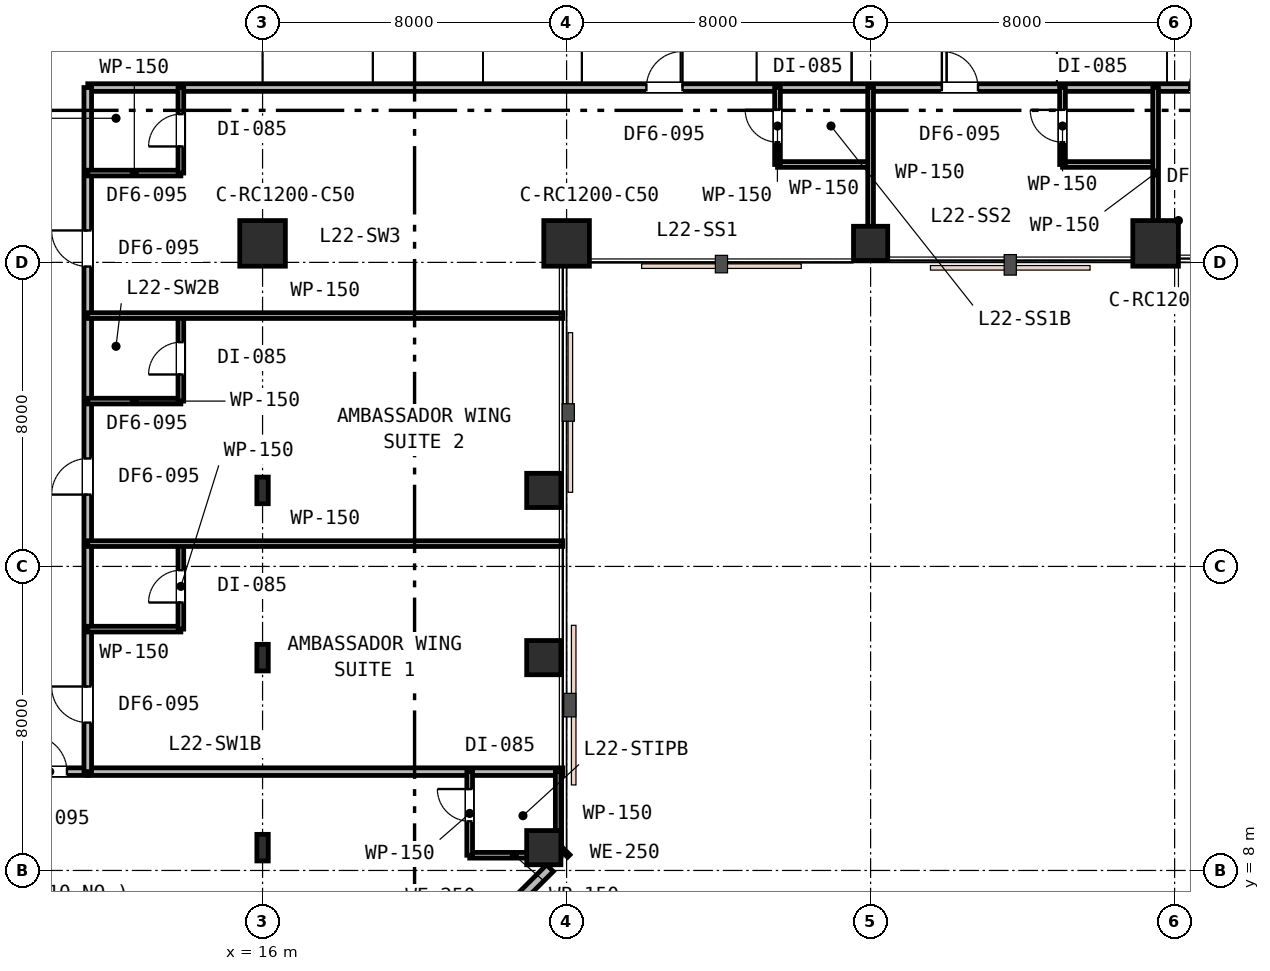
"""IFC4 building model, lengths in metres.
Left out: names, types, materials, properties, quantities, classifications, styles, units other than length and angle.
Written with IfcOpenShell. Run it as: python <this file> out.ifc"""

import sys

from ifc_helpers import new_model, si_unit, direction, frame, frame_2d, origin, origin_2d, place, context, subcontext, project, spatial, rectangle, i_section, extrude, element, fill, save


model = new_model("IFC4")
c1 = context("Model", 3, precision=1e-05, world=origin(), true_north=direction((0.0, 1.0)))
c2 = subcontext(c1, "Body", "Model", "MODEL_VIEW")
j1 = project(units=[si_unit("LENGTHUNIT", "METRE"), si_unit("PLANEANGLEUNIT", "RADIAN")], contexts=[c1])
p1 = place(None, origin())
s1 = spatial("IfcSite", under=j1, at=p1, CompositionType="ELEMENT")
p2 = place(p1, origin())
s2 = spatial("IfcBuilding", under=s1, at=p2, CompositionType="ELEMENT")
p3 = place(p2, frame((0.0, 0.0, 90.0)))
s3 = spatial("IfcBuildingStorey", under=s2, at=p3, CompositionType="ELEMENT", Elevation=90.0)
for number, where, z_axis, x_axis in (
    (1, (16.0, 24.5, 0.0), (0.0, 0.0, 1.0), (1.0, 0.0, 0.0)),
    (2, (24.0, 24.5, 0.0), (0.0, 0.0, 1.0), (1.0, 0.0, 0.0)),
):
    element("IfcColumn", number, at=place(p3, frame(where, z_axis=z_axis, x_axis=x_axis)), inside=s3, PredefinedType="COLUMN", context=c2, shape_type="SweptSolid", body=[
        extrude(rectangle(XDim=1.2, YDim=1.2, at=origin_2d()), origin(), (0.0, 0.0, 1.0), 3.6),
    ])
p4 = place(p3, frame((32.0, 24.5, 0.0), z_axis=(0.0, 0.0, 1.0), x_axis=(1.0, 0.0, 0.0)))
e3 = element("IfcColumn", 3, at=p4, inside=s3, PredefinedType="COLUMN", context=c2, shape_type="SweptSolid", body=[
    extrude(rectangle(XDim=0.9, YDim=0.9, at=origin_2d()), origin(), (0.0, 0.0, 1.0), 3.6),
])
p5 = place(p3, frame((39.5, 24.5, 0.0), z_axis=(0.0, 0.0, 1.0), x_axis=(1.0, 0.0, 0.0)))
e4 = element("IfcColumn", 4, at=p5, inside=s3, PredefinedType="COLUMN", context=c2, shape_type="SweptSolid", body=[
    extrude(rectangle(XDim=1.2, YDim=1.2, at=origin_2d()), origin(), (0.0, 0.0, 1.0), 3.6),
])
for number, where, z_axis, x_axis in (
    (5, (23.4, 8.6, 0.0), (0.0, 0.0, 1.0), (1.0, 0.0, 0.0)),
    (6, (23.4, 13.6, 0.0), (0.0, 0.0, 1.0), (1.0, 0.0, 0.0)),
    (7, (23.4, 18.0, 0.0), (0.0, 0.0, 1.0), (1.0, 0.0, 0.0)),
):
    element("IfcColumn", number, at=place(p3, frame(where, z_axis=z_axis, x_axis=x_axis)), inside=s3, PredefinedType="COLUMN", context=c2, shape_type="SweptSolid", body=[
        extrude(rectangle(XDim=0.9, YDim=0.9, at=origin_2d()), origin(), (0.0, 0.0, 1.0), 3.6),
    ])
for number, where, z_axis, x_axis in (
    (8, (16.0, 8.6, 0.0), (0.0, 0.0, 1.0), (1.0, 0.0, 0.0)),
    (9, (16.0, 13.6, 0.0), (0.0, 0.0, 1.0), (1.0, 0.0, 0.0)),
    (10, (16.0, 18.0, 0.0), (0.0, 0.0, 1.0), (1.0, 0.0, 0.0)),
):
    element("IfcColumn", number, at=place(p3, frame(where, z_axis=z_axis, x_axis=x_axis)), inside=s3, PredefinedType="COLUMN", context=c2, shape_type="SweptSolid", body=[
        extrude(i_section(OverallWidth=0.3, OverallDepth=0.7, WebThickness=0.017, FlangeThickness=0.032, FilletRadius=0.027, at=origin_2d()), origin(), (0.0, 0.0, 1.0), 3.6),
    ])
p6 = place(p3, frame((20.5, 5.0, 0.0), z_axis=(0.0, 0.0, 1.0), x_axis=(0.707106781187, 0.707106781187, 0.0)))
e11 = element("IfcWall", 11, at=p6, inside=s3, PredefinedType="STANDARD", context=c2, shape_type="SweptSolid", body=[
    extrude(rectangle(XDim=4.33, YDim=0.25, at=frame_2d((2.165, 0.0))), origin(), (0.0, 0.0, 1.0), 3.33),
])
p7 = place(p6, frame((1.565, 0.0, 0.85)))
e12 = element("IfcOpeningElement", 12, at=p7, cuts=e11, PredefinedType="OPENING", context=c2, shape_type="SweptSolid", body=[
    extrude(rectangle(XDim=1.2, YDim=1.6, at=frame_2d((0.6, 0.8))), frame((0.0, 0.135, 0.0), z_axis=(0.0, -1.0, 0.0), x_axis=(1.0, 0.0, 0.0)), (0.0, 0.0, 1.0), 0.27),
])
p8 = place(p3, frame((23.938, 8.438, 0.0), z_axis=(0.0, 0.0, 1.0), x_axis=(0.707106781187, 0.707106781187, 0.0)))
e13 = element("IfcWall", 13, at=p8, inside=s3, PredefinedType="STANDARD", context=c2, shape_type="SweptSolid", body=[
    extrude(rectangle(XDim=0.087, YDim=0.25, at=frame_2d((0.044, 0.0))), origin(), (0.0, 0.0, 1.0), 3.33),
])
p9 = place(p3, frame((11.4, 28.6, 0.0), z_axis=(0.0, 0.0, 1.0), x_axis=(1.0, 0.0, 0.0)))
e14 = element("IfcWall", 14, at=p9, inside=s3, PredefinedType="PARTITIONING", context=c2, shape_type="SweptSolid", body=[
    extrude(rectangle(XDim=32.8, YDim=0.2, at=frame_2d((16.4, 0.0))), origin(), (0.0, 0.0, 1.0), 2.83),
])
p10 = place(p9, frame((14.7, 0.0, 0.0)))
e15 = element("IfcOpeningElement", 15, at=p10, cuts=e14, PredefinedType="OPENING", context=c2, shape_type="SweptSolid", body=[
    extrude(rectangle(XDim=0.95, YDim=2.15, at=frame_2d((0.475, 1.075))), frame((0.0, 0.11, 0.0), z_axis=(0.0, -1.0, 0.0), x_axis=(1.0, 0.0, 0.0)), (0.0, 0.0, 1.0), 0.22),
])
p11 = place(p9, frame((22.475, 0.0, 0.0)))
e16 = element("IfcOpeningElement", 16, at=p11, cuts=e14, PredefinedType="OPENING", context=c2, shape_type="SweptSolid", body=[
    extrude(rectangle(XDim=0.95, YDim=2.15, at=frame_2d((0.475, 1.075))), frame((0.0, 0.11, 0.0), z_axis=(0.0, -1.0, 0.0), x_axis=(1.0, 0.0, 0.0)), (0.0, 0.0, 1.0), 0.22),
])
p12 = place(p9, frame((28.985, 0.0, 0.0)))
e17 = element("IfcOpeningElement", 17, at=p12, cuts=e14, PredefinedType="OPENING", context=c2, shape_type="SweptSolid", body=[
    extrude(rectangle(XDim=0.95, YDim=2.15, at=frame_2d((0.475, 1.075))), frame((0.0, 0.11, 0.0), z_axis=(0.0, -1.0, 0.0), x_axis=(1.0, 0.0, 0.0)), (0.0, 0.0, 1.0), 0.22),
])
p13 = place(p3, frame((11.4, 10.6, 0.0), z_axis=(0.0, 0.0, 1.0), x_axis=(1.0, 0.0, 0.0)))
e18 = element("IfcWall", 18, at=p13, inside=s3, PredefinedType="PARTITIONING", context=c2, shape_type="SweptSolid", body=[
    extrude(rectangle(XDim=12.5, YDim=0.2, at=frame_2d((6.25, 0.0))), origin(), (0.0, 0.0, 1.0), 2.83),
])
p14 = place(p3, frame((9.4, 10.6, 0.0), z_axis=(0.0, 0.0, 1.0), x_axis=(1.0, 0.0, 0.0)))
e19 = element("IfcWall", 19, at=p14, inside=s3, PredefinedType="PARTITIONING", context=c2, shape_type="SweptSolid", body=[
    extrude(rectangle(XDim=2.0, YDim=0.2, at=frame_2d((1.0, 0.0))), origin(), (0.0, 0.0, 1.0), 3.02),
])
p15 = place(p14, frame((0.502, 0.0, 0.0)))
e20 = element("IfcOpeningElement", 20, at=p15, cuts=e19, PredefinedType="OPENING", context=c2, shape_type="SweptSolid", body=[
    extrude(rectangle(XDim=0.95, YDim=2.15, at=frame_2d((0.475, 1.075))), frame((0.0, 0.11, 0.0), z_axis=(0.0, -1.0, 0.0), x_axis=(1.0, 0.0, 0.0)), (0.0, 0.0, 1.0), 0.22),
])
p16 = place(p3, frame((21.45, 8.4, 0.0), z_axis=(0.0, 0.0, 1.0), x_axis=(1.0, 0.0, 0.0)))
e21 = element("IfcWall", 21, at=p16, inside=s3, PredefinedType="PARTITIONING", context=c2, shape_type="SweptSolid", body=[
    extrude(rectangle(XDim=2.35, YDim=0.15, at=frame_2d((1.175, 0.0))), origin(), (0.0, 0.0, 1.0), 2.83),
])
p17 = place(p3, frame((21.45, 8.4, 0.0), z_axis=(0.0, 0.0, 1.0), x_axis=(0.0, 1.0, 0.0)))
e22 = element("IfcWall", 22, at=p17, inside=s3, PredefinedType="PARTITIONING", context=c2, shape_type="SweptSolid", body=[
    extrude(rectangle(XDim=2.2, YDim=0.15, at=frame_2d((1.1, 0.0))), origin(), (0.0, 0.0, 1.0), 2.83),
])
p18 = place(p17, frame((0.892, 0.0, 0.0)))
e23 = element("IfcOpeningElement", 23, at=p18, cuts=e22, PredefinedType="OPENING", context=c2, shape_type="SweptSolid", body=[
    extrude(rectangle(XDim=0.85, YDim=2.15, at=frame_2d((0.425, 1.075))), frame((0.0, 0.085, 0.0), z_axis=(0.0, -1.0, 0.0), x_axis=(1.0, 0.0, 0.0)), (0.0, 0.0, 1.0), 0.17),
])
p19 = place(p3, frame((23.78, 10.6, 0.0), z_axis=(0.0, 0.0, 1.0), x_axis=(0.0, -1.0, 0.0)))
e24 = element("IfcWall", 24, at=p19, inside=s3, PredefinedType="PARTITIONING", context=c2, shape_type="SweptSolid", body=[
    extrude(rectangle(XDim=2.22, YDim=0.15, at=frame_2d((1.11, 0.0))), origin(), (0.0, 0.0, 1.0), 2.83),
])
p20 = place(p3, frame((11.4, 10.6, 0.0), z_axis=(0.0, 0.0, 1.0), x_axis=(0.0, 1.0, 0.0)))
e25 = element("IfcWall", 25, at=p20, inside=s3, PredefinedType="PARTITIONING", context=c2, shape_type="SweptSolid", body=[
    extrude(rectangle(XDim=18.0, YDim=0.2, at=frame_2d((9.0, 0.0))), origin(), (0.0, 0.0, 1.0), 2.83),
])
p21 = place(p20, frame((1.29, 0.0, 0.0)))
e26 = element("IfcOpeningElement", 26, at=p21, cuts=e25, PredefinedType="OPENING", context=c2, shape_type="SweptSolid", body=[
    extrude(rectangle(XDim=0.95, YDim=2.15, at=frame_2d((0.475, 1.075))), frame((0.0, 0.11, 0.0), z_axis=(0.0, -1.0, 0.0), x_axis=(1.0, 0.0, 0.0)), (0.0, 0.0, 1.0), 0.22),
])
p22 = place(p20, frame((7.29, 0.0, 0.0)))
e27 = element("IfcOpeningElement", 27, at=p22, cuts=e25, PredefinedType="OPENING", context=c2, shape_type="SweptSolid", body=[
    extrude(rectangle(XDim=0.95, YDim=2.15, at=frame_2d((0.475, 1.075))), frame((0.0, 0.11, 0.0), z_axis=(0.0, -1.0, 0.0), x_axis=(1.0, 0.0, 0.0)), (0.0, 0.0, 1.0), 0.22),
])
p23 = place(p20, frame((13.29, 0.0, 0.0)))
e28 = element("IfcOpeningElement", 28, at=p23, cuts=e25, PredefinedType="OPENING", context=c2, shape_type="SweptSolid", body=[
    extrude(rectangle(XDim=0.95, YDim=2.15, at=frame_2d((0.475, 1.075))), frame((0.0, 0.11, 0.0), z_axis=(0.0, -1.0, 0.0), x_axis=(1.0, 0.0, 0.0)), (0.0, 0.0, 1.0), 0.22),
])
p24 = place(p3, frame((11.4, 14.35, 0.0), z_axis=(0.0, 0.0, 1.0), x_axis=(1.0, 0.0, 0.0)))
e29 = element("IfcWall", 29, at=p24, inside=s3, PredefinedType="PARTITIONING", context=c2, shape_type="SweptSolid", body=[
    extrude(rectangle(XDim=2.45, YDim=0.15, at=frame_2d((1.225, 0.0))), origin(), (0.0, 0.0, 1.0), 3.02),
])
p25 = place(p3, frame((13.85, 14.35, 0.0), z_axis=(0.0, 0.0, 1.0), x_axis=(0.0, 1.0, 0.0)))
e30 = element("IfcWall", 30, at=p25, inside=s3, PredefinedType="PARTITIONING", context=c2, shape_type="SweptSolid", body=[
    extrude(rectangle(XDim=2.25, YDim=0.15, at=frame_2d((1.125, 0.0))), origin(), (0.0, 0.0, 1.0), 3.02),
])
p26 = place(p25, frame((0.7, 0.0, 0.0)))
e31 = element("IfcOpeningElement", 31, at=p26, cuts=e30, PredefinedType="OPENING", context=c2, shape_type="SweptSolid", body=[
    extrude(rectangle(XDim=0.85, YDim=2.15, at=frame_2d((0.425, 1.075))), frame((0.0, 0.085, 0.0), z_axis=(0.0, -1.0, 0.0), x_axis=(1.0, 0.0, 0.0)), (0.0, 0.0, 1.0), 0.17),
])
p27 = place(p3, frame((11.4, 16.6, 0.0), z_axis=(0.0, 0.0, 1.0), x_axis=(1.0, 0.0, 0.0)))
e32 = element("IfcWall", 32, at=p27, inside=s3, PredefinedType="PARTITIONING", context=c2, shape_type="SweptSolid", body=[
    extrude(rectangle(XDim=12.5, YDim=0.15, at=frame_2d((6.25, 0.0))), origin(), (0.0, 0.0, 1.0), 2.83),
])
p28 = place(p3, frame((11.4, 20.35, 0.0), z_axis=(0.0, 0.0, 1.0), x_axis=(1.0, 0.0, 0.0)))
e33 = element("IfcWall", 33, at=p28, inside=s3, PredefinedType="PARTITIONING", context=c2, shape_type="SweptSolid", body=[
    extrude(rectangle(XDim=2.45, YDim=0.15, at=frame_2d((1.225, 0.0))), origin(), (0.0, 0.0, 1.0), 3.33),
])
p29 = place(p3, frame((13.85, 20.35, 0.0), z_axis=(0.0, 0.0, 1.0), x_axis=(0.0, 1.0, 0.0)))
e34 = element("IfcWall", 34, at=p29, inside=s3, PredefinedType="PARTITIONING", context=c2, shape_type="SweptSolid", body=[
    extrude(rectangle(XDim=2.25, YDim=0.15, at=frame_2d((1.125, 0.0))), origin(), (0.0, 0.0, 1.0), 3.33),
])
p30 = place(p29, frame((0.7, 0.0, 0.0)))
e35 = element("IfcOpeningElement", 35, at=p30, cuts=e34, PredefinedType="OPENING", context=c2, shape_type="SweptSolid", body=[
    extrude(rectangle(XDim=0.85, YDim=2.15, at=frame_2d((0.425, 1.075))), frame((0.0, 0.085, 0.0), z_axis=(0.0, -1.0, 0.0), x_axis=(1.0, 0.0, 0.0)), (0.0, 0.0, 1.0), 0.17),
])
p31 = place(p3, frame((11.4, 22.6, 0.0), z_axis=(0.0, 0.0, 1.0), x_axis=(1.0, 0.0, 0.0)))
e36 = element("IfcWall", 36, at=p31, inside=s3, PredefinedType="PARTITIONING", context=c2, shape_type="SweptSolid", body=[
    extrude(rectangle(XDim=12.5, YDim=0.15, at=frame_2d((6.25, 0.0))), origin(), (0.0, 0.0, 1.0), 2.83),
])
p32 = place(p3, frame((11.4, 26.35, 0.0), z_axis=(0.0, 0.0, 1.0), x_axis=(1.0, 0.0, 0.0)))
e37 = element("IfcWall", 37, at=p32, inside=s3, PredefinedType="PARTITIONING", context=c2, shape_type="SweptSolid", body=[
    extrude(rectangle(XDim=2.45, YDim=0.15, at=frame_2d((1.225, 0.0))), origin(), (0.0, 0.0, 1.0), 3.33),
])
p33 = place(p3, frame((13.85, 26.35, 0.0), z_axis=(0.0, 0.0, 1.0), x_axis=(0.0, 1.0, 0.0)))
e38 = element("IfcWall", 38, at=p33, inside=s3, PredefinedType="PARTITIONING", context=c2, shape_type="SweptSolid", body=[
    extrude(rectangle(XDim=2.25, YDim=0.15, at=frame_2d((1.125, 0.0))), origin(), (0.0, 0.0, 1.0), 3.33),
])
p34 = place(p33, frame((0.7, 0.0, 0.0)))
e39 = element("IfcOpeningElement", 39, at=p34, cuts=e38, PredefinedType="OPENING", context=c2, shape_type="SweptSolid", body=[
    extrude(rectangle(XDim=0.85, YDim=2.15, at=frame_2d((0.425, 1.075))), frame((0.0, 0.085, 0.0), z_axis=(0.0, -1.0, 0.0), x_axis=(1.0, 0.0, 0.0)), (0.0, 0.0, 1.0), 0.17),
])
p35 = place(p3, frame((29.55, 26.576, 0.0), z_axis=(0.0, 0.0, 1.0), x_axis=(1.0, 0.0, 0.0)))
e40 = element("IfcWall", 40, at=p35, inside=s3, PredefinedType="PARTITIONING", context=c2, shape_type="SweptSolid", body=[
    extrude(rectangle(XDim=2.45, YDim=0.15, at=frame_2d((1.225, 0.0))), origin(), (0.0, 0.0, 1.0), 3.33),
])
p36 = place(p3, frame((29.55, 26.576, 0.0), z_axis=(0.0, 0.0, 1.0), x_axis=(0.0, 1.0, 0.0)))
e41 = element("IfcWall", 41, at=p36, inside=s3, PredefinedType="PARTITIONING", context=c2, shape_type="SweptSolid", body=[
    extrude(rectangle(XDim=2.024, YDim=0.15, at=frame_2d((1.012, 0.0))), origin(), (0.0, 0.0, 1.0), 3.33),
])
p37 = place(p36, frame((0.587, 0.0, 0.0)))
e42 = element("IfcOpeningElement", 42, at=p37, cuts=e41, PredefinedType="OPENING", context=c2, shape_type="SweptSolid", body=[
    extrude(rectangle(XDim=0.85, YDim=2.15, at=frame_2d((0.425, 1.075))), frame((0.0, 0.085, 0.0), z_axis=(0.0, -1.0, 0.0), x_axis=(1.0, 0.0, 0.0)), (0.0, 0.0, 1.0), 0.17),
])
p38 = place(p3, frame((32.0, 28.6, 0.0), z_axis=(0.0, 0.0, 1.0), x_axis=(0.0, -1.0, 0.0)))
e43 = element("IfcWall", 43, at=p38, inside=s3, PredefinedType="PARTITIONING", context=c2, shape_type="SweptSolid", body=[
    extrude(rectangle(XDim=4.5, YDim=0.15, at=frame_2d((2.25, 0.0))), origin(), (0.0, 0.0, 1.0), 2.92),
])
p39 = place(p3, frame((37.05, 26.576, 0.0), z_axis=(0.0, 0.0, 1.0), x_axis=(1.0, 0.0, 0.0)))
e44 = element("IfcWall", 44, at=p39, inside=s3, PredefinedType="PARTITIONING", context=c2, shape_type="SweptSolid", body=[
    extrude(rectangle(XDim=2.45, YDim=0.15, at=frame_2d((1.225, 0.0))), origin(), (0.0, 0.0, 1.0), 2.83),
])
p40 = place(p3, frame((37.05, 26.576, 0.0), z_axis=(0.0, 0.0, 1.0), x_axis=(0.0, 1.0, 0.0)))
e45 = element("IfcWall", 45, at=p40, inside=s3, PredefinedType="PARTITIONING", context=c2, shape_type="SweptSolid", body=[
    extrude(rectangle(XDim=2.024, YDim=0.15, at=frame_2d((1.012, 0.0))), origin(), (0.0, 0.0, 1.0), 3.02),
])
p41 = place(p40, frame((0.587, 0.0, 0.0)))
e46 = element("IfcOpeningElement", 46, at=p41, cuts=e45, PredefinedType="OPENING", context=c2, shape_type="SweptSolid", body=[
    extrude(rectangle(XDim=0.85, YDim=2.15, at=frame_2d((0.425, 1.075))), frame((0.0, 0.085, 0.0), z_axis=(0.0, -1.0, 0.0), x_axis=(1.0, 0.0, 0.0)), (0.0, 0.0, 1.0), 0.17),
])
p42 = place(p3, frame((39.5, 28.6, 0.0), z_axis=(0.0, 0.0, 1.0), x_axis=(0.0, -1.0, 0.0)))
e47 = element("IfcWall", 47, at=p42, inside=s3, PredefinedType="PARTITIONING", context=c2, shape_type="SweptSolid", body=[
    extrude(rectangle(XDim=4.5, YDim=0.15, at=frame_2d((2.25, 0.0))), origin(), (0.0, 0.0, 1.0), 2.83),
])
p43 = place(p15, origin())
e48 = element("IfcDoor", 48, at=p43, inside=s3, OperationType="SINGLE_SWING_LEFT", PredefinedType="DOOR", context=c2, shape_type="SweptSolid", body=[
    extrude(rectangle(XDim=0.95, YDim=2.15, at=frame_2d((0.475, 1.075))), frame((0.0, 0.025, 0.0), z_axis=(0.0, -1.0, 0.0), x_axis=(1.0, 0.0, 0.0)), (0.0, 0.0, 1.0), 0.05),
])
fill(e20, e48)
p44 = place(p18, origin())
e49 = element("IfcDoor", 49, at=p44, inside=s3, OperationType="SINGLE_SWING_RIGHT", PredefinedType="DOOR", context=c2, shape_type="SweptSolid", body=[
    extrude(rectangle(XDim=0.85, YDim=2.15, at=frame_2d((0.425, 1.075))), frame((0.0, 0.025, 0.0), z_axis=(0.0, -1.0, 0.0), x_axis=(1.0, 0.0, 0.0)), (0.0, 0.0, 1.0), 0.05),
])
fill(e23, e49)
p45 = place(p21, origin())
e50 = element("IfcDoor", 50, at=p45, inside=s3, OperationType="SINGLE_SWING_RIGHT", PredefinedType="DOOR", context=c2, shape_type="SweptSolid", body=[
    extrude(rectangle(XDim=0.95, YDim=2.15, at=frame_2d((0.475, 1.075))), frame((0.0, 0.025, 0.0), z_axis=(0.0, -1.0, 0.0), x_axis=(1.0, 0.0, 0.0)), (0.0, 0.0, 1.0), 0.05),
])
fill(e26, e50)
p46 = place(p26, origin())
e51 = element("IfcDoor", 51, at=p46, inside=s3, OperationType="SINGLE_SWING_LEFT", PredefinedType="DOOR", context=c2, shape_type="SweptSolid", body=[
    extrude(rectangle(XDim=0.85, YDim=2.15, at=frame_2d((0.425, 1.075))), frame((0.0, 0.025, 0.0), z_axis=(0.0, -1.0, 0.0), x_axis=(1.0, 0.0, 0.0)), (0.0, 0.0, 1.0), 0.05),
])
fill(e31, e51)
p47 = place(p22, origin())
e52 = element("IfcDoor", 52, at=p47, inside=s3, OperationType="SINGLE_SWING_LEFT", PredefinedType="DOOR", context=c2, shape_type="SweptSolid", body=[
    extrude(rectangle(XDim=0.95, YDim=2.15, at=frame_2d((0.475, 1.075))), frame((0.0, 0.025, 0.0), z_axis=(0.0, -1.0, 0.0), x_axis=(1.0, 0.0, 0.0)), (0.0, 0.0, 1.0), 0.05),
])
fill(e27, e52)
p48 = place(p30, origin())
e53 = element("IfcDoor", 53, at=p48, inside=s3, OperationType="SINGLE_SWING_LEFT", PredefinedType="DOOR", context=c2, shape_type="SweptSolid", body=[
    extrude(rectangle(XDim=0.85, YDim=2.15, at=frame_2d((0.425, 1.075))), frame((0.0, 0.025, 0.0), z_axis=(0.0, -1.0, 0.0), x_axis=(1.0, 0.0, 0.0)), (0.0, 0.0, 1.0), 0.05),
])
fill(e35, e53)
p49 = place(p23, origin())
e54 = element("IfcDoor", 54, at=p49, inside=s3, OperationType="SINGLE_SWING_RIGHT", PredefinedType="DOOR", context=c2, shape_type="SweptSolid", body=[
    extrude(rectangle(XDim=0.95, YDim=2.15, at=frame_2d((0.475, 1.075))), frame((0.0, 0.025, 0.0), z_axis=(0.0, -1.0, 0.0), x_axis=(1.0, 0.0, 0.0)), (0.0, 0.0, 1.0), 0.05),
])
fill(e28, e54)
p50 = place(p34, origin())
e55 = element("IfcDoor", 55, at=p50, inside=s3, OperationType="SINGLE_SWING_LEFT", PredefinedType="DOOR", context=c2, shape_type="SweptSolid", body=[
    extrude(rectangle(XDim=0.85, YDim=2.15, at=frame_2d((0.425, 1.075))), frame((0.0, 0.025, 0.0), z_axis=(0.0, -1.0, 0.0), x_axis=(1.0, 0.0, 0.0)), (0.0, 0.0, 1.0), 0.05),
])
fill(e39, e55)
p51 = place(p10, origin())
e56 = element("IfcDoor", 56, at=p51, inside=s3, OperationType="SINGLE_SWING_RIGHT", PredefinedType="DOOR", context=c2, shape_type="SweptSolid", body=[
    extrude(rectangle(XDim=0.95, YDim=2.15, at=frame_2d((0.475, 1.075))), frame((0.0, 0.025, 0.0), z_axis=(0.0, -1.0, 0.0), x_axis=(1.0, 0.0, 0.0)), (0.0, 0.0, 1.0), 0.05),
])
fill(e15, e56)
p52 = place(p37, origin())
e57 = element("IfcDoor", 57, at=p52, inside=s3, OperationType="SINGLE_SWING_RIGHT", PredefinedType="DOOR", context=c2, shape_type="SweptSolid", body=[
    extrude(rectangle(XDim=0.85, YDim=2.15, at=frame_2d((0.425, 1.075))), frame((0.0, 0.025, 0.0), z_axis=(0.0, -1.0, 0.0), x_axis=(1.0, 0.0, 0.0)), (0.0, 0.0, 1.0), 0.05),
])
fill(e42, e57)
p53 = place(p11, origin())
e58 = element("IfcDoor", 58, at=p53, inside=s3, OperationType="SINGLE_SWING_LEFT", PredefinedType="DOOR", context=c2, shape_type="SweptSolid", body=[
    extrude(rectangle(XDim=0.95, YDim=2.15, at=frame_2d((0.475, 1.075))), frame((0.0, 0.025, 0.0), z_axis=(0.0, -1.0, 0.0), x_axis=(1.0, 0.0, 0.0)), (0.0, 0.0, 1.0), 0.05),
])
fill(e16, e58)
p54 = place(p41, origin())
e59 = element("IfcDoor", 59, at=p54, inside=s3, OperationType="SINGLE_SWING_RIGHT", PredefinedType="DOOR", context=c2, shape_type="SweptSolid", body=[
    extrude(rectangle(XDim=0.85, YDim=2.15, at=frame_2d((0.425, 1.075))), frame((0.0, 0.025, 0.0), z_axis=(0.0, -1.0, 0.0), x_axis=(1.0, 0.0, 0.0)), (0.0, 0.0, 1.0), 0.05),
])
fill(e46, e59)
p55 = place(p12, origin())
e60 = element("IfcDoor", 60, at=p55, inside=s3, OperationType="SINGLE_SWING_RIGHT", PredefinedType="DOOR", context=c2, shape_type="SweptSolid", body=[
    extrude(rectangle(XDim=0.95, YDim=2.15, at=frame_2d((0.475, 1.075))), frame((0.0, 0.025, 0.0), z_axis=(0.0, -1.0, 0.0), x_axis=(1.0, 0.0, 0.0)), (0.0, 0.0, 1.0), 0.05),
])
fill(e17, e60)
save(model, sys.argv[1])
